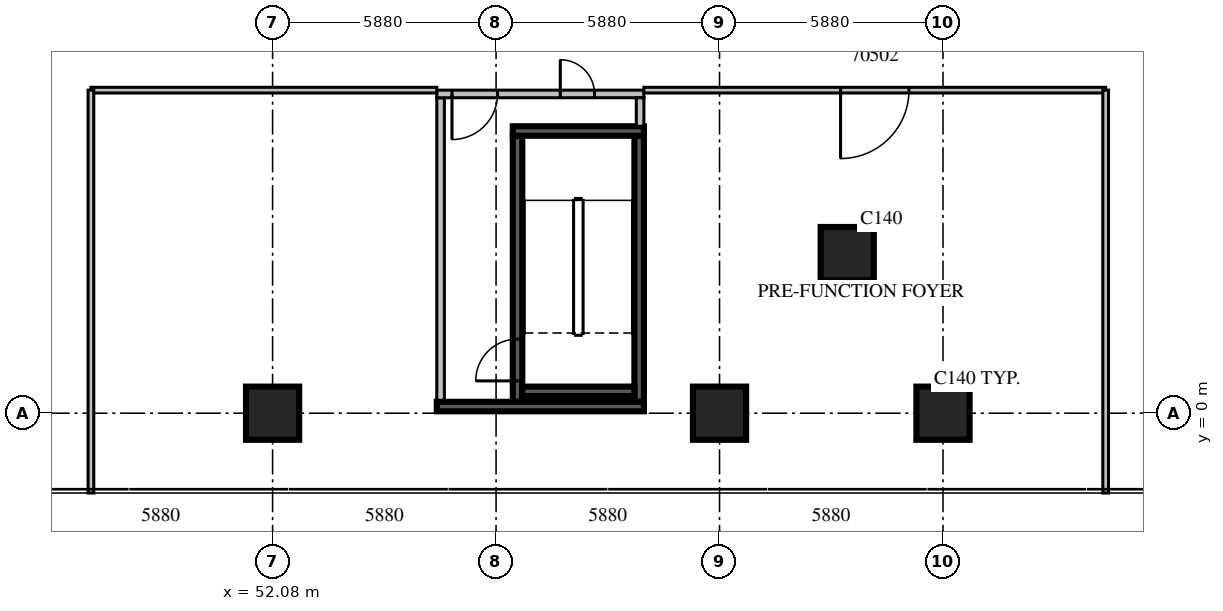
"""IFC4 building model, lengths in metres.
Left out: names, types, materials, properties, quantities, classifications, styles, units other than length and angle.
Written with IfcOpenShell. Run it as: python <this file> out.ifc"""

import sys

from ifc_helpers import new_model, si_unit, direction, frame, frame_2d, origin, origin_2d, place, context, subcontext, project, spatial, rectangle, extrude, source, transform, mapped, element, fill, save


model = new_model("IFC4")
c1 = context("Model", 3, precision=1e-05, world=origin(), true_north=direction((0.0, 1.0)))
c2 = subcontext(c1, "Body", "Model", "MODEL_VIEW")
j1 = project(units=[si_unit("LENGTHUNIT", "METRE"), si_unit("PLANEANGLEUNIT", "RADIAN")], contexts=[c1])
p1 = place(None, origin())
s1 = spatial("IfcSite", under=j1, at=p1, CompositionType="ELEMENT")
p2 = place(p1, origin())
s2 = spatial("IfcBuilding", under=s1, at=p2, CompositionType="ELEMENT")
p3 = place(p2, frame((0.0, 0.0, 12.9)))
s3 = spatial("IfcBuildingStorey", under=s2, at=p3, CompositionType="ELEMENT", Elevation=12.9)
m1 = source(origin(), c2, "Body", "SweptSolid", [
    extrude(rectangle(XDim=1.4, YDim=1.4, at=origin_2d()), origin(), (0.0, 0.0, 1.0), 5.4),
])
for number, where, z_axis, x_axis in (
    (1, (52.08, 0.0, 0.0), (0.0, 0.0, 1.0), (1.0, 0.0, 0.0)),
    (2, (63.84, 0.0, 0.0), (0.0, 0.0, 1.0), (1.0, 0.0, 0.0)),
    (3, (67.2, 4.2, 0.0), (0.0, 0.0, 1.0), (1.0, 0.0, 0.0)),
    (4, (69.72, 0.0, 0.0), (0.0, 0.0, 1.0), (1.0, 0.0, 0.0)),
):
    element("IfcColumn", number, at=place(p3, frame(where, z_axis=z_axis, x_axis=x_axis)), inside=s3, PredefinedType="COLUMN", context=c2, shape_type="MappedRepresentation", body=[
        mapped(m1, transform((0.0, 0.0, 0.0), scale=1.0)),
    ])
m2 = source(origin(), c2, "Body", "SweptSolid", [
    extrude(rectangle(XDim=7.0, YDim=0.25, at=frame_2d((3.5, 0.0))), origin(), (0.0, 0.0, 1.0), 4.8),
])
p4 = place(p3, frame((58.525, 0.3, 0.0), z_axis=(0.0, 0.0, 1.0), x_axis=(0.0, 1.0, 0.0)))
e5 = element("IfcWall", 5, at=p4, inside=s3, PredefinedType="SOLIDWALL", context=c2, shape_type="MappedRepresentation", body=[
    mapped(m2, transform((0.0, 0.0, 0.0), scale=1.0)),
])
m3 = source(origin(), c2, "Body", "SweptSolid", [
    extrude(rectangle(XDim=1.1, YDim=2.1, at=frame_2d((0.55, 1.05))), frame((0.0, 0.135, 0.0), z_axis=(0.0, -1.0, 0.0), x_axis=(1.0, 0.0, 0.0)), (0.0, 0.0, 1.0), 0.27),
])
p5 = place(p4, frame((0.55, 0.0, 0.0)))
e6 = element("IfcOpeningElement", 6, at=p5, cuts=e5, PredefinedType="OPENING", context=c2, shape_type="MappedRepresentation", body=[
    mapped(m3, transform((0.0, 0.0, 0.0), scale=1.0)),
])
p6 = place(p3, frame((61.725, 0.3, 0.0), z_axis=(0.0, 0.0, 1.0), x_axis=(0.0, 1.0, 0.0)))
e7 = element("IfcWall", 7, at=p6, inside=s3, PredefinedType="SOLIDWALL", context=c2, shape_type="MappedRepresentation", body=[
    mapped(m2, transform((0.0, 0.0, 0.0), scale=1.0)),
])
m4 = source(origin(), c2, "Body", "SweptSolid", [
    extrude(rectangle(XDim=3.45, YDim=0.25, at=frame_2d((1.725, 0.0))), origin(), (0.0, 0.0, 1.0), 4.8),
])
p7 = place(p3, frame((58.4, 7.425, 0.0), z_axis=(0.0, 0.0, 1.0), x_axis=(1.0, 0.0, 0.0)))
e8 = element("IfcWall", 8, at=p7, inside=s3, PredefinedType="SOLIDWALL", context=c2, shape_type="MappedRepresentation", body=[
    mapped(m4, transform((0.0, 0.0, 0.0), scale=1.0)),
])
m5 = source(origin(), c2, "Body", "SweptSolid", [
    extrude(rectangle(XDim=2.95, YDim=0.25, at=frame_2d((1.475, 0.0))), origin(), (0.0, 0.0, 1.0), 4.8),
])
p8 = place(p3, frame((58.65, 0.575, 0.0), z_axis=(0.0, 0.0, 1.0), x_axis=(1.0, 0.0, 0.0)))
e9 = element("IfcWall", 9, at=p8, inside=s3, PredefinedType="SOLIDWALL", context=c2, shape_type="MappedRepresentation", body=[
    mapped(m5, transform((0.0, 0.0, 0.0), scale=1.0)),
])
m6 = source(origin(), c2, "Body", "SweptSolid", [
    extrude(rectangle(XDim=8.0, YDim=0.2, at=frame_2d((4.0, 0.0))), origin(), (0.0, 0.0, 1.0), 4.8),
])
p9 = place(p3, frame((56.5, 0.3, 0.0), z_axis=(0.0, 0.0, 1.0), x_axis=(0.0, 1.0, 0.0)))
e10 = element("IfcWall", 10, at=p9, inside=s3, PredefinedType="PARTITIONING", context=c2, shape_type="MappedRepresentation", body=[
    mapped(m6, transform((0.0, 0.0, 0.0), scale=1.0)),
])
m7 = source(origin(), c2, "Body", "SweptSolid", [
    extrude(rectangle(XDim=5.45, YDim=0.2, at=frame_2d((2.725, 0.0))), origin(), (0.0, 0.0, 1.0), 4.8),
])
p10 = place(p3, frame((56.4, 8.4, 0.0), z_axis=(0.0, 0.0, 1.0), x_axis=(1.0, 0.0, 0.0)))
e11 = element("IfcWall", 11, at=p10, inside=s3, PredefinedType="PARTITIONING", context=c2, shape_type="MappedRepresentation", body=[
    mapped(m7, transform((0.0, 0.0, 0.0), scale=1.0)),
])
m8 = source(origin(), c2, "Body", "SweptSolid", [
    extrude(rectangle(XDim=1.2, YDim=2.1, at=frame_2d((0.6, 1.05))), frame((0.0, 0.11, 0.0), z_axis=(0.0, -1.0, 0.0), x_axis=(1.0, 0.0, 0.0)), (0.0, 0.0, 1.0), 0.22),
])
p11 = place(p10, frame((0.4, 0.0, 0.0)))
e12 = element("IfcOpeningElement", 12, at=p11, cuts=e11, PredefinedType="OPENING", context=c2, shape_type="MappedRepresentation", body=[
    mapped(m8, transform((0.0, 0.0, 0.0), scale=1.0)),
])
m9 = source(origin(), c2, "Body", "SweptSolid", [
    extrude(rectangle(XDim=0.9, YDim=2.1, at=frame_2d((0.45, 1.05))), frame((0.0, 0.11, 0.0), z_axis=(0.0, -1.0, 0.0), x_axis=(1.0, 0.0, 0.0)), (0.0, 0.0, 1.0), 0.22),
])
p12 = place(p10, frame((3.25, 0.0, 0.0)))
e13 = element("IfcOpeningElement", 13, at=p12, cuts=e11, PredefinedType="OPENING", context=c2, shape_type="MappedRepresentation", body=[
    mapped(m9, transform((0.0, 0.0, 0.0), scale=1.0)),
])
m10 = source(origin(), c2, "Body", "SweptSolid", [
    extrude(rectangle(XDim=0.75, YDim=0.2, at=frame_2d((0.375, 0.0))), origin(), (0.0, 0.0, 1.0), 4.8),
])
p13 = place(p3, frame((61.75, 7.55, 0.0), z_axis=(0.0, 0.0, 1.0), x_axis=(0.0, 1.0, 0.0)))
e14 = element("IfcWall", 14, at=p13, inside=s3, PredefinedType="PARTITIONING", context=c2, shape_type="MappedRepresentation", body=[
    mapped(m10, transform((0.0, 0.0, 0.0), scale=1.0)),
])
m11 = source(origin(), c2, "Body", "SweptSolid", [
    extrude(rectangle(XDim=5.45, YDim=0.25, at=frame_2d((2.725, 0.0))), origin(), (0.0, 0.0, 1.0), 4.8),
])
p14 = place(p3, frame((56.4, 0.175, 0.0), z_axis=(0.0, 0.0, 1.0), x_axis=(1.0, 0.0, 0.0)))
e15 = element("IfcWall", 15, at=p14, inside=s3, PredefinedType="SOLIDWALL", context=c2, shape_type="MappedRepresentation", body=[
    mapped(m11, transform((0.0, 0.0, 0.0), scale=1.0)),
])
m12 = source(origin(), c2, "Body", "SweptSolid", [
    extrude(rectangle(XDim=9.1, YDim=0.15, at=frame_2d((4.55, 0.0))), origin(), (0.0, 0.0, 1.0), 4.8),
])
p15 = place(p3, frame((47.3, 8.5, 0.0), z_axis=(0.0, 0.0, 1.0), x_axis=(1.0, 0.0, 0.0)))
e16 = element("IfcWall", 16, at=p15, inside=s3, PredefinedType="PARTITIONING", context=c2, shape_type="MappedRepresentation", body=[
    mapped(m12, transform((0.0, 0.0, 0.0), scale=1.0)),
])
m13 = source(origin(), c2, "Body", "SweptSolid", [
    extrude(rectangle(XDim=12.15, YDim=0.15, at=frame_2d((6.075, 0.0))), origin(), (0.0, 0.0, 1.0), 4.8),
])
p16 = place(p3, frame((61.85, 8.5, 0.0), z_axis=(0.0, 0.0, 1.0), x_axis=(1.0, 0.0, 0.0)))
e17 = element("IfcWall", 17, at=p16, inside=s3, PredefinedType="PARTITIONING", context=c2, shape_type="MappedRepresentation", body=[
    mapped(m13, transform((0.0, 0.0, 0.0), scale=1.0)),
])
m14 = source(origin(), c2, "Body", "SweptSolid", [
    extrude(rectangle(XDim=1.8, YDim=2.1, at=frame_2d((0.9, 1.05))), frame((0.0, 0.085, 0.0), z_axis=(0.0, -1.0, 0.0), x_axis=(1.0, 0.0, 0.0)), (0.0, 0.0, 1.0), 0.17),
])
p17 = place(p16, frame((5.175, 0.0, 0.0)))
e18 = element("IfcOpeningElement", 18, at=p17, cuts=e17, PredefinedType="OPENING", context=c2, shape_type="MappedRepresentation", body=[
    mapped(m14, transform((0.0, 0.0, 0.0), scale=1.0)),
])
m15 = source(origin(), c2, "Body", "SweptSolid", [
    extrude(rectangle(XDim=10.6, YDim=0.15, at=frame_2d((5.3, 0.0))), origin(), (0.0, 0.0, 1.0), 4.8),
])
for number, where, z_axis, x_axis in (
    (19, (47.3, -2.1, 0.0), (0.0, 0.0, 1.0), (0.0, 1.0, 0.0)),
    (20, (74.0, -2.1, 0.0), (0.0, 0.0, 1.0), (0.0, 1.0, 0.0)),
):
    element("IfcWall", number, at=place(p3, frame(where, z_axis=z_axis, x_axis=x_axis)), inside=s3, PredefinedType="PARTITIONING", context=c2, shape_type="MappedRepresentation", body=[
        mapped(m15, transform((0.0, 0.0, 0.0), scale=1.0)),
    ])
m16 = source(origin(), c2, "Body", "SweptSolid", [
    extrude(rectangle(XDim=1.1, YDim=2.1, at=frame_2d((0.55, 1.05))), frame((0.0, 0.025, 0.0), z_axis=(0.0, -1.0, 0.0), x_axis=(1.0, 0.0, 0.0)), (0.0, 0.0, 1.0), 0.05),
])
p18 = place(p5, origin())
e21 = element("IfcDoor", 21, at=p18, inside=s3, OperationType="SINGLE_SWING_LEFT", PredefinedType="DOOR", context=c2, shape_type="MappedRepresentation", body=[
    mapped(m16, transform((0.0, 0.0, 0.0), scale=1.0)),
])
fill(e6, e21)
m17 = source(origin(), c2, "Body", "SweptSolid", [
    extrude(rectangle(XDim=1.2, YDim=2.1, at=frame_2d((0.6, 1.05))), frame((0.0, 0.025, 0.0), z_axis=(0.0, -1.0, 0.0), x_axis=(1.0, 0.0, 0.0)), (0.0, 0.0, 1.0), 0.05),
])
p19 = place(p11, origin())
e22 = element("IfcDoor", 22, at=p19, inside=s3, OperationType="SINGLE_SWING_RIGHT", PredefinedType="DOOR", context=c2, shape_type="MappedRepresentation", body=[
    mapped(m17, transform((0.0, 0.0, 0.0), scale=1.0)),
])
fill(e12, e22)
m18 = source(origin(), c2, "Body", "SweptSolid", [
    extrude(rectangle(XDim=0.9, YDim=2.1, at=frame_2d((0.45, 1.05))), frame((0.0, 0.025, 0.0), z_axis=(0.0, -1.0, 0.0), x_axis=(1.0, 0.0, 0.0)), (0.0, 0.0, 1.0), 0.05),
])
p20 = place(p12, origin())
e23 = element("IfcDoor", 23, at=p20, inside=s3, OperationType="SINGLE_SWING_LEFT", PredefinedType="DOOR", context=c2, shape_type="MappedRepresentation", body=[
    mapped(m18, transform((0.0, 0.0, 0.0), scale=1.0)),
])
fill(e13, e23)
m19 = source(origin(), c2, "Body", "SweptSolid", [
    extrude(rectangle(XDim=1.8, YDim=2.1, at=frame_2d((0.9, 1.05))), frame((0.0, 0.025, 0.0), z_axis=(0.0, -1.0, 0.0), x_axis=(1.0, 0.0, 0.0)), (0.0, 0.0, 1.0), 0.05),
])
p21 = place(p17, origin())
e24 = element("IfcDoor", 24, at=p21, inside=s3, OperationType="DOUBLE_DOOR_SINGLE_SWING", PredefinedType="DOOR", context=c2, shape_type="MappedRepresentation", body=[
    mapped(m19, transform((0.0, 0.0, 0.0), scale=1.0)),
])
fill(e18, e24)
save(model, sys.argv[1])
